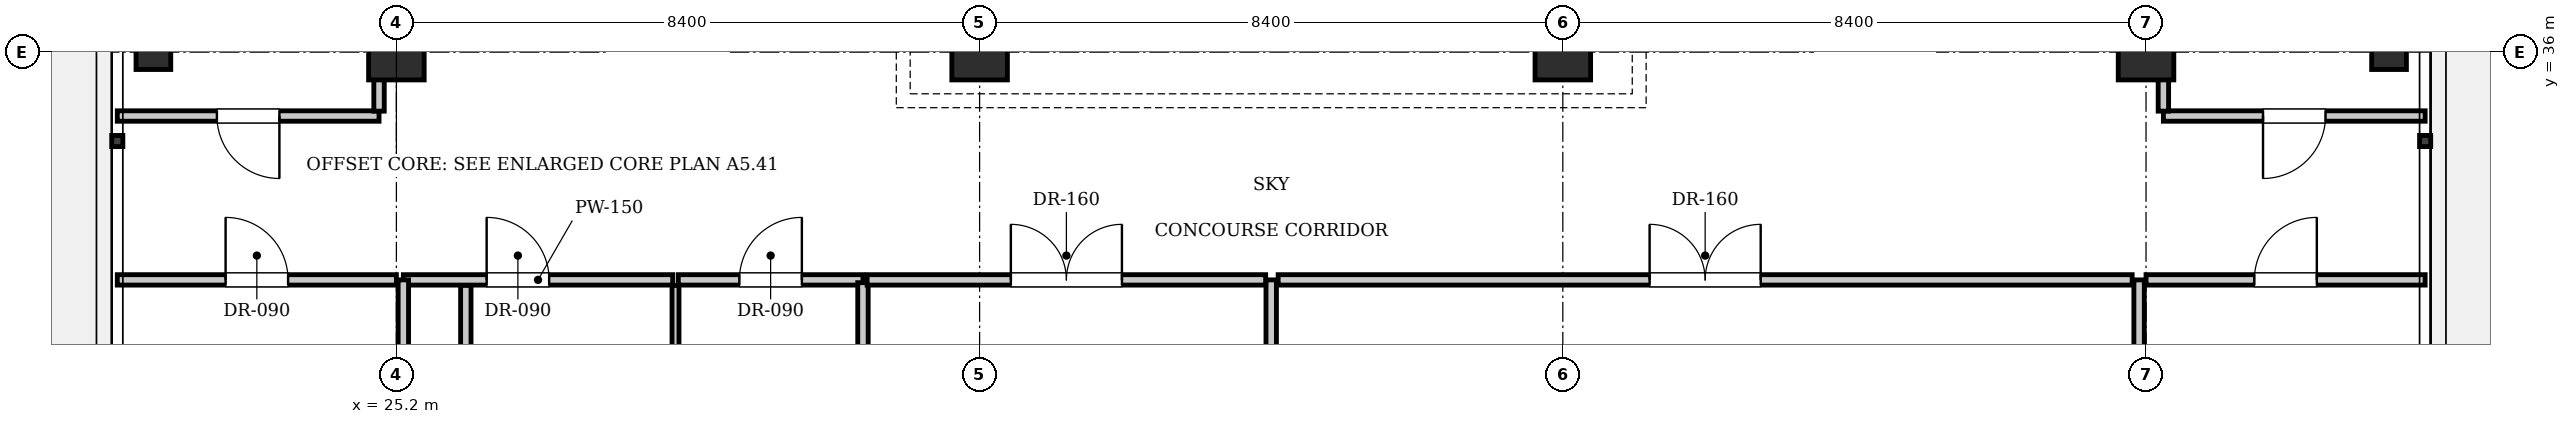
"""IFC4 building model, lengths in metres.
Left out: names, types, materials, properties, quantities, classifications, styles, units other than length and angle.
Written with IfcOpenShell. Run it as: python <this file> out.ifc"""

import sys

from ifc_helpers import new_model, si_unit, direction, frame, frame_2d, origin, origin_2d, place, context, subcontext, project, spatial, rectangle, i_section, extrude, element, fill, save


model = new_model("IFC4")
c1 = context("Model", 3, precision=1e-05, world=origin(), true_north=direction((0.0, 1.0)))
c2 = subcontext(c1, "Body", "Model", "MODEL_VIEW")
j1 = project(units=[si_unit("LENGTHUNIT", "METRE"), si_unit("PLANEANGLEUNIT", "RADIAN")], contexts=[c1])
p1 = place(None, origin())
s1 = spatial("IfcSite", under=j1, at=p1, CompositionType="ELEMENT")
p2 = place(p1, origin())
s2 = spatial("IfcBuilding", under=s1, at=p2, CompositionType="ELEMENT")
p3 = place(p2, frame((0.0, 0.0, 359.1)))
s3 = spatial("IfcBuildingStorey", under=s2, at=p3, CompositionType="ELEMENT", Elevation=359.1)
for number, where, z_axis, x_axis in (
    (1, (25.2, 36.0, 0.0), (0.0, 0.0, 1.0), (1.0, 0.0, 0.0)),
    (2, (33.6, 36.0, 0.0), (0.0, 0.0, 1.0), (1.0, 0.0, 0.0)),
    (3, (42.0, 36.0, 0.0), (0.0, 0.0, 1.0), (1.0, 0.0, 0.0)),
    (4, (50.4, 36.0, 0.0), (0.0, 0.0, 1.0), (1.0, 0.0, 0.0)),
):
    element("IfcColumn", number, at=place(p3, frame(where, z_axis=z_axis, x_axis=x_axis)), inside=s3, PredefinedType="COLUMN", context=c2, shape_type="SweptSolid", body=[
        extrude(rectangle(XDim=0.8, YDim=0.8, at=origin_2d()), origin(), (0.0, 0.0, 1.0), 5.25),
    ])
for number, where, z_axis, x_axis in (
    (5, (21.7, 36.0, -0.26), (0.0, 0.0, 1.0), (1.0, 0.0, 0.0)),
    (6, (53.9, 36.0, -0.26), (0.0, 0.0, 1.0), (1.0, 0.0, 0.0)),
):
    element("IfcColumn", number, at=place(p3, frame(where, z_axis=z_axis, x_axis=x_axis)), inside=s3, PredefinedType="COLUMN", context=c2, shape_type="SweptSolid", body=[
        extrude(i_section(OverallWidth=0.5, OverallDepth=0.5, WebThickness=0.022, FlangeThickness=0.032, at=origin_2d()), origin(), (0.0, 0.0, 1.0), 5.51),
    ])
p4 = place(p3, frame((25.3, 32.72, 0.0), z_axis=(0.0, 0.0, 1.0), x_axis=(1.0, 0.0, 0.0)))
e7 = element("IfcWall", 7, at=p4, inside=s3, PredefinedType="PARTITIONING", context=c2, shape_type="SweptSolid", body=[
    extrude(rectangle(XDim=3.88, YDim=0.15, at=frame_2d((1.94, 0.0))), origin(), (0.0, 0.0, 1.0), 4.97),
])
p5 = place(p4, frame((1.2, 0.0, 0.0)))
e8 = element("IfcOpeningElement", 8, at=p5, cuts=e7, PredefinedType="OPENING", context=c2, shape_type="SweptSolid", body=[
    extrude(rectangle(XDim=0.9, YDim=2.1, at=frame_2d((0.45, 1.05))), frame((0.0, 0.085, 0.0), z_axis=(0.0, -1.0, 0.0), x_axis=(1.0, 0.0, 0.0)), (0.0, 0.0, 1.0), 0.17),
])
p6 = place(p3, frame((29.26, 32.72, 0.0), z_axis=(0.0, 0.0, 1.0), x_axis=(1.0, 0.0, 0.0)))
e9 = element("IfcWall", 9, at=p6, inside=s3, PredefinedType="PARTITIONING", context=c2, shape_type="SweptSolid", body=[
    extrude(rectangle(XDim=2.66, YDim=0.15, at=frame_2d((1.33, 0.0))), origin(), (0.0, 0.0, 1.0), 4.97),
])
p7 = place(p6, frame((0.88, 0.0, 0.0)))
e10 = element("IfcOpeningElement", 10, at=p7, cuts=e9, PredefinedType="OPENING", context=c2, shape_type="SweptSolid", body=[
    extrude(rectangle(XDim=0.9, YDim=2.1, at=frame_2d((0.45, 1.05))), frame((0.0, 0.085, 0.0), z_axis=(0.0, -1.0, 0.0), x_axis=(1.0, 0.0, 0.0)), (0.0, 0.0, 1.0), 0.17),
])
p8 = place(p3, frame((26.2, 29.46, 0.0), z_axis=(0.0, 0.0, 1.0), x_axis=(0.0, 1.0, 0.0)))
e11 = element("IfcWall", 11, at=p8, inside=s3, PredefinedType="PARTITIONING", context=c2, shape_type="SweptSolid", body=[
    extrude(rectangle(XDim=3.18, YDim=0.15, at=frame_2d((1.59, 0.0))), origin(), (0.0, 0.0, 1.0), 4.97),
])
p9 = place(p3, frame((29.22, 29.46, 0.0), z_axis=(0.0, 0.0, 1.0), x_axis=(0.0, 1.0, 0.0)))
e12 = element("IfcWall", 12, at=p9, inside=s3, PredefinedType="PARTITIONING", context=c2, shape_type="SweptSolid", body=[
    extrude(rectangle(XDim=3.18, YDim=0.1, at=frame_2d((1.59, 0.0))), origin(), (0.0, 0.0, 1.0), 4.97),
])
p10 = place(p3, frame((31.92, 29.46, 0.0), z_axis=(0.0, 0.0, 1.0), x_axis=(0.0, 1.0, 0.0)))
e13 = element("IfcWall", 13, at=p10, inside=s3, PredefinedType="PARTITIONING", context=c2, shape_type="SweptSolid", body=[
    extrude(rectangle(XDim=3.22, YDim=0.15, at=frame_2d((1.61, 0.0))), origin(), (0.0, 0.0, 1.0), 4.97),
])
p11 = place(p3, frame((37.8, 20.68, 0.0), z_axis=(0.0, 0.0, 1.0), x_axis=(0.0, 1.0, 0.0)))
e14 = element("IfcWall", 14, at=p11, inside=s3, PredefinedType="PARTITIONING", context=c2, shape_type="SweptSolid", body=[
    extrude(rectangle(XDim=12.04, YDim=0.15, at=frame_2d((6.02, 0.0))), origin(), (0.0, 0.0, 1.0), 4.97),
])
for number, where, z_axis, x_axis in (
    (15, (25.3, 20.68, 0.0), (0.0, 0.0, 1.0), (0.0, 1.0, 0.0)),
    (16, (50.3, 20.68, 0.0), (0.0, 0.0, 1.0), (0.0, 1.0, 0.0)),
):
    element("IfcWall", number, at=place(p3, frame(where, z_axis=z_axis, x_axis=x_axis)), inside=s3, PredefinedType="PARTITIONING", context=c2, shape_type="SweptSolid", body=[
        extrude(rectangle(XDim=12.04, YDim=0.15, at=frame_2d((6.02, 0.0))), origin(), (0.0, 0.0, 1.0), 4.507),
    ])
p12 = place(p3, frame((31.98, 32.72, 0.0), z_axis=(0.0, 0.0, 1.0), x_axis=(1.0, 0.0, 0.0)))
e17 = element("IfcWall", 17, at=p12, inside=s3, PredefinedType="PARTITIONING", context=c2, shape_type="SweptSolid", body=[
    extrude(rectangle(XDim=5.74, YDim=0.15, at=frame_2d((2.87, 0.0))), origin(), (0.0, 0.0, 1.0), 4.97),
])
p13 = place(p12, frame((2.07, 0.0, 0.0)))
e18 = element("IfcOpeningElement", 18, at=p13, cuts=e17, PredefinedType="OPENING", context=c2, shape_type="SweptSolid", body=[
    extrude(rectangle(XDim=1.6, YDim=2.3, at=frame_2d((0.8, 1.15))), frame((0.0, 0.085, 0.0), z_axis=(0.0, -1.0, 0.0), x_axis=(1.0, 0.0, 0.0)), (0.0, 0.0, 1.0), 0.17),
])
p14 = place(p3, frame((37.9, 32.72, 0.0), z_axis=(0.0, 0.0, 1.0), x_axis=(1.0, 0.0, 0.0)))
e19 = element("IfcWall", 19, at=p14, inside=s3, PredefinedType="PARTITIONING", context=c2, shape_type="SweptSolid", body=[
    extrude(rectangle(XDim=12.3, YDim=0.15, at=frame_2d((6.15, 0.0))), origin(), (0.0, 0.0, 1.0), 4.97),
])
p15 = place(p14, frame((5.35, 0.0, 0.0)))
e20 = element("IfcOpeningElement", 20, at=p15, cuts=e19, PredefinedType="OPENING", context=c2, shape_type="SweptSolid", body=[
    extrude(rectangle(XDim=1.6, YDim=2.3, at=frame_2d((0.8, 1.15))), frame((0.0, 0.085, 0.0), z_axis=(0.0, -1.0, 0.0), x_axis=(1.0, 0.0, 0.0)), (0.0, 0.0, 1.0), 0.17),
])
p16 = place(p3, frame((21.18, 32.72, 0.0), z_axis=(0.0, 0.0, 1.0), x_axis=(1.0, 0.0, 0.0)))
e21 = element("IfcWall", 21, at=p16, inside=s3, PredefinedType="PARTITIONING", context=c2, shape_type="SweptSolid", body=[
    extrude(rectangle(XDim=4.02, YDim=0.15, at=frame_2d((2.01, 0.0))), origin(), (0.0, 0.0, 1.0), 4.97),
])
p17 = place(p16, frame((1.56, 0.0, 0.0)))
e22 = element("IfcOpeningElement", 22, at=p17, cuts=e21, PredefinedType="OPENING", context=c2, shape_type="SweptSolid", body=[
    extrude(rectangle(XDim=0.9, YDim=2.1, at=frame_2d((0.45, 1.05))), frame((0.0, 0.085, 0.0), z_axis=(0.0, -1.0, 0.0), x_axis=(1.0, 0.0, 0.0)), (0.0, 0.0, 1.0), 0.17),
])
p18 = place(p3, frame((50.4, 32.72, 0.0), z_axis=(0.0, 0.0, 1.0), x_axis=(1.0, 0.0, 0.0)))
e23 = element("IfcWall", 23, at=p18, inside=s3, PredefinedType="PARTITIONING", context=c2, shape_type="SweptSolid", body=[
    extrude(rectangle(XDim=4.02, YDim=0.15, at=frame_2d((2.01, 0.0))), origin(), (0.0, 0.0, 1.0), 4.97),
])
p19 = place(p18, frame((1.56, 0.0, 0.0)))
e24 = element("IfcOpeningElement", 24, at=p19, cuts=e23, PredefinedType="OPENING", context=c2, shape_type="SweptSolid", body=[
    extrude(rectangle(XDim=0.9, YDim=2.1, at=frame_2d((0.45, 1.05))), frame((0.0, 0.085, 0.0), z_axis=(0.0, -1.0, 0.0), x_axis=(1.0, 0.0, 0.0)), (0.0, 0.0, 1.0), 0.17),
])
p20 = place(p3, frame((21.18, 35.08, 0.0), z_axis=(0.0, 0.0, 1.0), x_axis=(1.0, 0.0, 0.0)))
e25 = element("IfcWall", 25, at=p20, inside=s3, PredefinedType="PARTITIONING", context=c2, shape_type="SweptSolid", body=[
    extrude(rectangle(XDim=3.77, YDim=0.15, at=frame_2d((1.885, 0.0))), origin(), (0.0, 0.0, 1.0), 4.97),
])
p21 = place(p20, frame((1.435, 0.0, 0.0)))
e26 = element("IfcOpeningElement", 26, at=p21, cuts=e25, PredefinedType="OPENING", context=c2, shape_type="SweptSolid", body=[
    extrude(rectangle(XDim=0.9, YDim=2.1, at=frame_2d((0.45, 1.05))), frame((0.0, 0.085, 0.0), z_axis=(0.0, -1.0, 0.0), x_axis=(1.0, 0.0, 0.0)), (0.0, 0.0, 1.0), 0.17),
])
p22 = place(p3, frame((24.95, 35.15, 0.0), z_axis=(0.0, 0.0, 1.0), x_axis=(0.0, 1.0, 0.0)))
e27 = element("IfcWall", 27, at=p22, inside=s3, PredefinedType="PARTITIONING", context=c2, shape_type="SweptSolid", body=[
    extrude(rectangle(XDim=18.65, YDim=0.15, at=frame_2d((9.325, 0.0))), origin(), (0.0, 0.0, 1.0), 4.97),
])
p23 = place(p3, frame((50.65, 35.08, 0.0), z_axis=(0.0, 0.0, 1.0), x_axis=(1.0, 0.0, 0.0)))
e28 = element("IfcWall", 28, at=p23, inside=s3, PredefinedType="PARTITIONING", context=c2, shape_type="SweptSolid", body=[
    extrude(rectangle(XDim=3.77, YDim=0.15, at=frame_2d((1.885, 0.0))), origin(), (0.0, 0.0, 1.0), 4.97),
])
p24 = place(p23, frame((1.435, 0.0, 0.0)))
e29 = element("IfcOpeningElement", 29, at=p24, cuts=e28, PredefinedType="OPENING", context=c2, shape_type="SweptSolid", body=[
    extrude(rectangle(XDim=0.9, YDim=2.1, at=frame_2d((0.45, 1.05))), frame((0.0, 0.085, 0.0), z_axis=(0.0, -1.0, 0.0), x_axis=(1.0, 0.0, 0.0)), (0.0, 0.0, 1.0), 0.17),
])
p25 = place(p3, frame((50.65, 35.15, 0.0), z_axis=(0.0, 0.0, 1.0), x_axis=(0.0, 1.0, 0.0)))
e30 = element("IfcWall", 30, at=p25, inside=s3, PredefinedType="PARTITIONING", context=c2, shape_type="SweptSolid", body=[
    extrude(rectangle(XDim=18.65, YDim=0.15, at=frame_2d((9.325, 0.0))), origin(), (0.0, 0.0, 1.0), 4.97),
])
p26 = place(p5, origin())
e31 = element("IfcDoor", 31, at=p26, inside=s3, OperationType="SINGLE_SWING_LEFT", PredefinedType="DOOR", context=c2, shape_type="SweptSolid", body=[
    extrude(rectangle(XDim=0.9, YDim=2.1, at=frame_2d((0.45, 1.05))), frame((0.0, 0.025, 0.0), z_axis=(0.0, -1.0, 0.0), x_axis=(1.0, 0.0, 0.0)), (0.0, 0.0, 1.0), 0.05),
])
fill(e8, e31)
p27 = place(p7, origin())
e32 = element("IfcDoor", 32, at=p27, inside=s3, OperationType="SINGLE_SWING_RIGHT", PredefinedType="DOOR", context=c2, shape_type="SweptSolid", body=[
    extrude(rectangle(XDim=0.9, YDim=2.1, at=frame_2d((0.45, 1.05))), frame((0.0, 0.025, 0.0), z_axis=(0.0, -1.0, 0.0), x_axis=(1.0, 0.0, 0.0)), (0.0, 0.0, 1.0), 0.05),
])
fill(e10, e32)
p28 = place(p13, origin())
e33 = element("IfcDoor", 33, at=p28, inside=s3, OperationType="DOUBLE_DOOR_SINGLE_SWING", PredefinedType="DOOR", context=c2, shape_type="SweptSolid", body=[
    extrude(rectangle(XDim=1.6, YDim=2.3, at=frame_2d((0.8, 1.15))), frame((0.0, 0.025, 0.0), z_axis=(0.0, -1.0, 0.0), x_axis=(1.0, 0.0, 0.0)), (0.0, 0.0, 1.0), 0.05),
])
fill(e18, e33)
p29 = place(p15, origin())
e34 = element("IfcDoor", 34, at=p29, inside=s3, OperationType="DOUBLE_DOOR_SINGLE_SWING", PredefinedType="DOOR", context=c2, shape_type="SweptSolid", body=[
    extrude(rectangle(XDim=1.6, YDim=2.3, at=frame_2d((0.8, 1.15))), frame((0.0, 0.025, 0.0), z_axis=(0.0, -1.0, 0.0), x_axis=(1.0, 0.0, 0.0)), (0.0, 0.0, 1.0), 0.05),
])
fill(e20, e34)
p30 = place(p17, origin())
e35 = element("IfcDoor", 35, at=p30, inside=s3, OperationType="SINGLE_SWING_LEFT", PredefinedType="DOOR", context=c2, shape_type="SweptSolid", body=[
    extrude(rectangle(XDim=0.9, YDim=2.1, at=frame_2d((0.45, 1.05))), frame((0.0, 0.025, 0.0), z_axis=(0.0, -1.0, 0.0), x_axis=(1.0, 0.0, 0.0)), (0.0, 0.0, 1.0), 0.05),
])
fill(e22, e35)
p31 = place(p19, origin())
e36 = element("IfcDoor", 36, at=p31, inside=s3, OperationType="SINGLE_SWING_RIGHT", PredefinedType="DOOR", context=c2, shape_type="SweptSolid", body=[
    extrude(rectangle(XDim=0.9, YDim=2.1, at=frame_2d((0.45, 1.05))), frame((0.0, 0.025, 0.0), z_axis=(0.0, -1.0, 0.0), x_axis=(1.0, 0.0, 0.0)), (0.0, 0.0, 1.0), 0.05),
])
fill(e24, e36)
p32 = place(p21, frame((0.9, 0.0, 0.0), z_axis=(0.0, 0.0, 1.0), x_axis=(-1.0, 0.0, 0.0)))
e37 = element("IfcDoor", 37, at=p32, inside=s3, OperationType="SINGLE_SWING_LEFT", PredefinedType="DOOR", context=c2, shape_type="SweptSolid", body=[
    extrude(rectangle(XDim=0.9, YDim=2.1, at=frame_2d((0.45, 1.05))), frame((0.0, 0.025, 0.0), z_axis=(0.0, -1.0, 0.0), x_axis=(1.0, 0.0, 0.0)), (0.0, 0.0, 1.0), 0.05),
])
fill(e26, e37)
p33 = place(p24, frame((0.9, 0.0, 0.0), z_axis=(0.0, 0.0, 1.0), x_axis=(-1.0, 0.0, 0.0)))
e38 = element("IfcDoor", 38, at=p33, inside=s3, OperationType="SINGLE_SWING_RIGHT", PredefinedType="DOOR", context=c2, shape_type="SweptSolid", body=[
    extrude(rectangle(XDim=0.9, YDim=2.1, at=frame_2d((0.45, 1.05))), frame((0.0, 0.025, 0.0), z_axis=(0.0, -1.0, 0.0), x_axis=(1.0, 0.0, 0.0)), (0.0, 0.0, 1.0), 0.05),
])
fill(e29, e38)
save(model, sys.argv[1])
